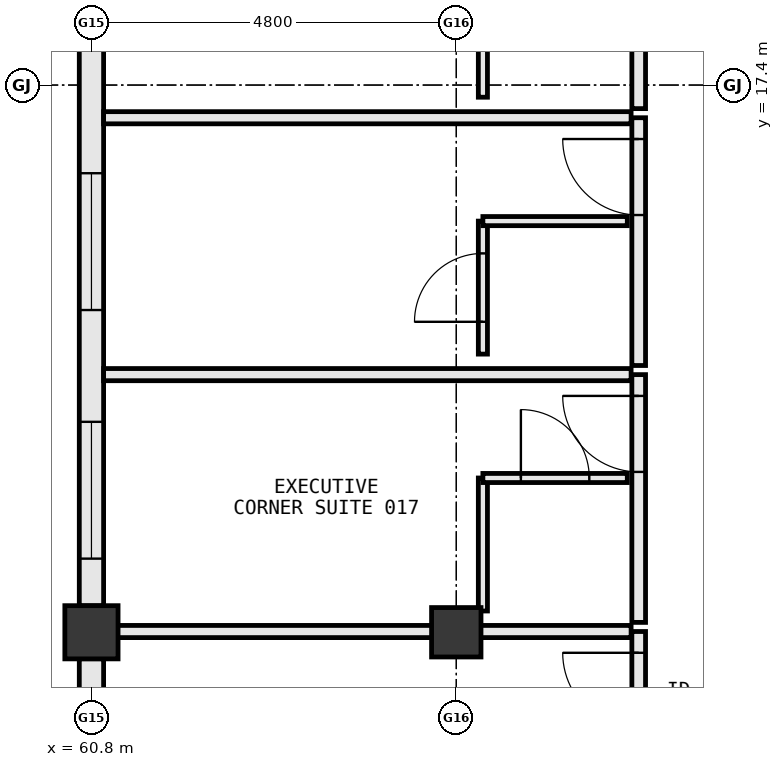
"""IFC4 building model, lengths in metres.
Left out: names, types, materials, properties, quantities, classifications, styles, units other than length and angle.
Written with IfcOpenShell. Run it as: python <this file> out.ifc"""

import sys

from ifc_helpers import new_model, si_unit, direction, frame, frame_2d, origin, origin_2d, place, context, subcontext, project, spatial, rectangle, extrude, element, fill, save


model = new_model("IFC4")
c1 = context("Model", 3, precision=1e-05, world=origin(), true_north=direction((0.0, 1.0)))
c2 = subcontext(c1, "Body", "Model", "MODEL_VIEW")
j1 = project(units=[si_unit("LENGTHUNIT", "METRE"), si_unit("PLANEANGLEUNIT", "RADIAN")], contexts=[c1])
p1 = place(None, origin())
s1 = spatial("IfcSite", under=j1, at=p1, CompositionType="ELEMENT")
p2 = place(p1, origin())
s2 = spatial("IfcBuilding", under=s1, at=p2, CompositionType="ELEMENT")
p3 = place(p2, frame((0.0, 0.0, 10.8)))
s3 = spatial("IfcBuildingStorey", under=s2, at=p3, CompositionType="ELEMENT", Elevation=10.8)
p4 = place(p3, frame((60.8, 10.2, 0.0), z_axis=(0.0, 0.0, 1.0), x_axis=(1.0, 0.0, 0.0)))
e1 = element("IfcColumn", 1, at=p4, inside=s3, PredefinedType="COLUMN", context=c2, shape_type="SweptSolid", body=[
    extrude(rectangle(XDim=0.7, YDim=0.7, at=origin_2d()), origin(), (0.0, 0.0, 1.0), 5.4),
])
p5 = place(p3, frame((65.6, 10.2, 0.0), z_axis=(0.0, 0.0, 1.0), x_axis=(1.0, 0.0, 0.0)))
e2 = element("IfcColumn", 2, at=p5, inside=s3, PredefinedType="COLUMN", context=c2, shape_type="SweptSolid", body=[
    extrude(rectangle(XDim=0.65, YDim=0.65, at=origin_2d()), origin(), (0.0, 0.0, 1.0), 5.4),
])
p6 = place(p3, frame((60.8, 18.252, 0.0), z_axis=(0.0, 0.0, 1.0), x_axis=(0.0, -1.0, 0.0)))
e3 = element("IfcWall", 3, at=p6, inside=s3, PredefinedType="STANDARD", context=c2, shape_type="SweptSolid", body=[
    extrude(rectangle(XDim=7.704, YDim=0.32, at=frame_2d((3.852, 0.0))), origin(), (0.0, 0.0, 1.0), 4.255),
])
p7 = place(p6, frame((5.283, 0.0, 0.85)))
e4 = element("IfcOpeningElement", 4, at=p7, cuts=e3, PredefinedType="OPENING", context=c2, shape_type="SweptSolid", body=[
    extrude(rectangle(XDim=1.8, YDim=1.85, at=frame_2d((0.9, 0.925))), frame((0.0, 0.172, 0.0), z_axis=(0.0, -1.0, 0.0), x_axis=(1.0, 0.0, 0.0)), (0.0, 0.0, 1.0), 0.344),
])
p8 = place(p6, frame((2.012, 0.0, 0.85)))
e5 = element("IfcOpeningElement", 5, at=p8, cuts=e3, PredefinedType="OPENING", context=c2, shape_type="SweptSolid", body=[
    extrude(rectangle(XDim=1.8, YDim=1.85, at=frame_2d((0.9, 0.925))), frame((0.0, 0.172, 0.0), z_axis=(0.0, -1.0, 0.0), x_axis=(1.0, 0.0, 0.0)), (0.0, 0.0, 1.0), 0.344),
])
p9 = place(p3, frame((60.8, 9.852, 0.0), z_axis=(0.0, 0.0, 1.0), x_axis=(0.0, -1.0, 0.0)))
e6 = element("IfcWall", 6, at=p9, inside=s3, PredefinedType="STANDARD", context=c2, shape_type="SweptSolid", body=[
    extrude(rectangle(XDim=8.904, YDim=0.32, at=frame_2d((4.452, 0.0))), origin(), (0.0, 0.0, 1.0), 4.155),
])
p10 = place(p9, frame((3.477, 0.0, 0.85)))
e7 = element("IfcOpeningElement", 7, at=p10, cuts=e6, PredefinedType="OPENING", context=c2, shape_type="SweptSolid", body=[
    extrude(rectangle(XDim=1.95, YDim=1.9, at=frame_2d((0.975, 0.95))), frame((0.0, 0.172, 0.0), z_axis=(0.0, -1.0, 0.0), x_axis=(1.0, 0.0, 0.0)), (0.0, 0.0, 1.0), 0.344),
])
p11 = place(p9, frame((6.753, 0.0, 0.85)))
e8 = element("IfcOpeningElement", 8, at=p11, cuts=e6, PredefinedType="OPENING", context=c2, shape_type="SweptSolid", body=[
    extrude(rectangle(XDim=1.8, YDim=1.85, at=frame_2d((0.9, 0.925))), frame((0.0, 0.172, 0.0), z_axis=(0.0, -1.0, 0.0), x_axis=(1.0, 0.0, 0.0)), (0.0, 0.0, 1.0), 0.344),
])
p12 = place(p9, frame((0.551, 0.0, 0.85)))
e9 = element("IfcOpeningElement", 9, at=p12, cuts=e6, PredefinedType="OPENING", context=c2, shape_type="SweptSolid", body=[
    extrude(rectangle(XDim=1.8, YDim=1.85, at=frame_2d((0.9, 0.925))), frame((0.0, 0.172, 0.0), z_axis=(0.0, -1.0, 0.0), x_axis=(1.0, 0.0, 0.0)), (0.0, 0.0, 1.0), 0.344),
])
p13 = place(p3, frame((68.0, 6.95, 0.0), z_axis=(0.0, 0.0, 1.0), x_axis=(0.0, 1.0, 0.0)))
e10 = element("IfcWall", 10, at=p13, inside=s3, PredefinedType="PARTITIONING", context=c2, shape_type="SweptSolid", body=[
    extrude(rectangle(XDim=3.26, YDim=0.18, at=frame_2d((1.63, 0.0))), origin(), (0.0, 0.0, 1.0), 4.8),
])
p14 = place(p13, frame((1.98, 0.0, 0.0)))
e11 = element("IfcOpeningElement", 11, at=p14, cuts=e10, PredefinedType="OPENING", context=c2, shape_type="SweptSolid", body=[
    extrude(rectangle(XDim=1.0, YDim=2.2, at=frame_2d((0.5, 1.1))), frame((0.0, 0.102, 0.0), z_axis=(0.0, -1.0, 0.0), x_axis=(1.0, 0.0, 0.0)), (0.0, 0.0, 1.0), 0.204),
])
p15 = place(p3, frame((60.96, 10.21, 0.0), z_axis=(0.0, 0.0, 1.0), x_axis=(1.0, 0.0, 0.0)))
e12 = element("IfcWall", 12, at=p15, inside=s3, PredefinedType="PARTITIONING", context=c2, shape_type="SweptSolid", body=[
    extrude(rectangle(XDim=6.94, YDim=0.16, at=frame_2d((3.47, 0.0))), origin(), (0.0, 0.0, 1.0), 4.175),
])
p16 = place(p3, frame((68.0, 10.33, 0.0), z_axis=(0.0, 0.0, 1.0), x_axis=(0.0, 1.0, 0.0)))
e13 = element("IfcWall", 13, at=p16, inside=s3, PredefinedType="PARTITIONING", context=c2, shape_type="SweptSolid", body=[
    extrude(rectangle(XDim=3.26, YDim=0.18, at=frame_2d((1.63, 0.0))), origin(), (0.0, 0.0, 1.0), 4.8),
])
p17 = place(p16, frame((1.98, 0.0, 0.0)))
e14 = element("IfcOpeningElement", 14, at=p17, cuts=e13, PredefinedType="OPENING", context=c2, shape_type="SweptSolid", body=[
    extrude(rectangle(XDim=1.0, YDim=2.2, at=frame_2d((0.5, 1.1))), frame((0.0, 0.102, 0.0), z_axis=(0.0, -1.0, 0.0), x_axis=(1.0, 0.0, 0.0)), (0.0, 0.0, 1.0), 0.204),
])
p18 = place(p3, frame((60.96, 13.59, 0.0), z_axis=(0.0, 0.0, 1.0), x_axis=(1.0, 0.0, 0.0)))
e15 = element("IfcWall", 15, at=p18, inside=s3, PredefinedType="PARTITIONING", context=c2, shape_type="SweptSolid", body=[
    extrude(rectangle(XDim=6.94, YDim=0.16, at=frame_2d((3.47, 0.0))), origin(), (0.0, 0.0, 1.0), 4.8),
])
p19 = place(p3, frame((65.95, 10.48, 0.0), z_axis=(0.0, 0.0, 1.0), x_axis=(0.0, 1.0, 0.0)))
e16 = element("IfcWall", 16, at=p19, inside=s3, PredefinedType="PARTITIONING", context=c2, shape_type="SweptSolid", body=[
    extrude(rectangle(XDim=1.75, YDim=0.12, at=frame_2d((0.875, 0.0))), origin(), (0.0, 0.0, 1.0), 4.255),
])
p20 = place(p3, frame((65.95, 12.23, 0.0), z_axis=(0.0, 0.0, 1.0), x_axis=(1.0, 0.0, 0.0)))
e17 = element("IfcWall", 17, at=p20, inside=s3, PredefinedType="PARTITIONING", context=c2, shape_type="SweptSolid", body=[
    extrude(rectangle(XDim=1.9, YDim=0.12, at=frame_2d((0.95, 0.0))), origin(), (0.0, 0.0, 1.0), 4.8),
])
p21 = place(p20, frame((0.5, 0.0, 0.0)))
e18 = element("IfcOpeningElement", 18, at=p21, cuts=e17, PredefinedType="OPENING", context=c2, shape_type="SweptSolid", body=[
    extrude(rectangle(XDim=0.9, YDim=2.15, at=frame_2d((0.45, 1.075))), frame((0.0, 0.072, 0.0), z_axis=(0.0, -1.0, 0.0), x_axis=(1.0, 0.0, 0.0)), (0.0, 0.0, 1.0), 0.144),
])
p22 = place(p3, frame((68.0, 13.71, 0.0), z_axis=(0.0, 0.0, 1.0), x_axis=(0.0, 1.0, 0.0)))
e19 = element("IfcWall", 19, at=p22, inside=s3, PredefinedType="PARTITIONING", context=c2, shape_type="SweptSolid", body=[
    extrude(rectangle(XDim=3.26, YDim=0.18, at=frame_2d((1.63, 0.0))), origin(), (0.0, 0.0, 1.0), 4.8),
])
p23 = place(p22, frame((1.98, 0.0, 0.0)))
e20 = element("IfcOpeningElement", 20, at=p23, cuts=e19, PredefinedType="OPENING", context=c2, shape_type="SweptSolid", body=[
    extrude(rectangle(XDim=1.0, YDim=2.2, at=frame_2d((0.5, 1.1))), frame((0.0, 0.102, 0.0), z_axis=(0.0, -1.0, 0.0), x_axis=(1.0, 0.0, 0.0)), (0.0, 0.0, 1.0), 0.204),
])
p24 = place(p3, frame((60.96, 16.97, 0.0), z_axis=(0.0, 0.0, 1.0), x_axis=(1.0, 0.0, 0.0)))
e21 = element("IfcWall", 21, at=p24, inside=s3, PredefinedType="PARTITIONING", context=c2, shape_type="SweptSolid", body=[
    extrude(rectangle(XDim=6.94, YDim=0.16, at=frame_2d((3.47, 0.0))), origin(), (0.0, 0.0, 1.0), 4.8),
])
p25 = place(p3, frame((65.95, 13.86, 0.0), z_axis=(0.0, 0.0, 1.0), x_axis=(0.0, 1.0, 0.0)))
e22 = element("IfcWall", 22, at=p25, inside=s3, PredefinedType="PARTITIONING", context=c2, shape_type="SweptSolid", body=[
    extrude(rectangle(XDim=1.75, YDim=0.12, at=frame_2d((0.875, 0.0))), origin(), (0.0, 0.0, 1.0), 4.255),
])
p26 = place(p25, frame((0.425, 0.0, 0.0)))
e23 = element("IfcOpeningElement", 23, at=p26, cuts=e22, PredefinedType="OPENING", context=c2, shape_type="SweptSolid", body=[
    extrude(rectangle(XDim=0.9, YDim=2.15, at=frame_2d((0.45, 1.075))), frame((0.0, 0.072, 0.0), z_axis=(0.0, -1.0, 0.0), x_axis=(1.0, 0.0, 0.0)), (0.0, 0.0, 1.0), 0.144),
])
p27 = place(p3, frame((65.95, 15.61, 0.0), z_axis=(0.0, 0.0, 1.0), x_axis=(1.0, 0.0, 0.0)))
e24 = element("IfcWall", 24, at=p27, inside=s3, PredefinedType="PARTITIONING", context=c2, shape_type="SweptSolid", body=[
    extrude(rectangle(XDim=1.9, YDim=0.12, at=frame_2d((0.95, 0.0))), origin(), (0.0, 0.0, 1.0), 4.8),
])
p28 = place(p3, frame((68.0, 17.09, 0.0), z_axis=(0.0, 0.0, 1.0), x_axis=(0.0, 1.0, 0.0)))
e25 = element("IfcWall", 25, at=p28, inside=s3, PredefinedType="PARTITIONING", context=c2, shape_type="SweptSolid", body=[
    extrude(rectangle(XDim=3.26, YDim=0.18, at=frame_2d((1.63, 0.0))), origin(), (0.0, 0.0, 1.0), 4.8),
])
p29 = place(p28, frame((1.98, 0.0, 0.0)))
e26 = element("IfcOpeningElement", 26, at=p29, cuts=e25, PredefinedType="OPENING", context=c2, shape_type="SweptSolid", body=[
    extrude(rectangle(XDim=1.0, YDim=2.2, at=frame_2d((0.5, 1.1))), frame((0.0, 0.102, 0.0), z_axis=(0.0, -1.0, 0.0), x_axis=(1.0, 0.0, 0.0)), (0.0, 0.0, 1.0), 0.204),
])
p30 = place(p3, frame((65.95, 17.24, 0.0), z_axis=(0.0, 0.0, 1.0), x_axis=(0.0, 1.0, 0.0)))
e27 = element("IfcWall", 27, at=p30, inside=s3, PredefinedType="PARTITIONING", context=c2, shape_type="SweptSolid", body=[
    extrude(rectangle(XDim=1.75, YDim=0.12, at=frame_2d((0.875, 0.0))), origin(), (0.0, 0.0, 1.0), 4.255),
])
p31 = place(p7, origin())
e28 = element("IfcWindow", 28, at=p31, inside=s3, PartitioningType="SINGLE_PANEL", PredefinedType="WINDOW", context=c2, shape_type="SweptSolid", body=[
    extrude(rectangle(XDim=1.8, YDim=1.85, at=frame_2d((0.9, 0.925))), frame((0.0, 0.03, 0.0), z_axis=(0.0, -1.0, 0.0), x_axis=(1.0, 0.0, 0.0)), (0.0, 0.0, 1.0), 0.06),
])
fill(e4, e28)
p32 = place(p8, origin())
e29 = element("IfcWindow", 29, at=p32, inside=s3, PartitioningType="SINGLE_PANEL", PredefinedType="WINDOW", context=c2, shape_type="SweptSolid", body=[
    extrude(rectangle(XDim=1.8, YDim=1.85, at=frame_2d((0.9, 0.925))), frame((0.0, 0.03, 0.0), z_axis=(0.0, -1.0, 0.0), x_axis=(1.0, 0.0, 0.0)), (0.0, 0.0, 1.0), 0.06),
])
fill(e5, e29)
p33 = place(p14, origin())
e30 = element("IfcDoor", 30, at=p33, inside=s3, OperationType="SINGLE_SWING_RIGHT", PredefinedType="DOOR", context=c2, shape_type="SweptSolid", body=[
    extrude(rectangle(XDim=1.0, YDim=2.2, at=frame_2d((0.5, 1.1))), frame((0.0, 0.025, 0.0), z_axis=(0.0, -1.0, 0.0), x_axis=(1.0, 0.0, 0.0)), (0.0, 0.0, 1.0), 0.05),
])
fill(e11, e30)
p34 = place(p17, origin())
e31 = element("IfcDoor", 31, at=p34, inside=s3, OperationType="SINGLE_SWING_RIGHT", PredefinedType="DOOR", context=c2, shape_type="SweptSolid", body=[
    extrude(rectangle(XDim=1.0, YDim=2.2, at=frame_2d((0.5, 1.1))), frame((0.0, 0.025, 0.0), z_axis=(0.0, -1.0, 0.0), x_axis=(1.0, 0.0, 0.0)), (0.0, 0.0, 1.0), 0.05),
])
fill(e14, e31)
p35 = place(p21, origin())
e32 = element("IfcDoor", 32, at=p35, inside=s3, OperationType="SINGLE_SWING_LEFT", PredefinedType="DOOR", context=c2, shape_type="SweptSolid", body=[
    extrude(rectangle(XDim=0.9, YDim=2.15, at=frame_2d((0.45, 1.075))), frame((0.0, 0.025, 0.0), z_axis=(0.0, -1.0, 0.0), x_axis=(1.0, 0.0, 0.0)), (0.0, 0.0, 1.0), 0.05),
])
fill(e18, e32)
p36 = place(p23, origin())
e33 = element("IfcDoor", 33, at=p36, inside=s3, OperationType="SINGLE_SWING_RIGHT", PredefinedType="DOOR", context=c2, shape_type="SweptSolid", body=[
    extrude(rectangle(XDim=1.0, YDim=2.2, at=frame_2d((0.5, 1.1))), frame((0.0, 0.025, 0.0), z_axis=(0.0, -1.0, 0.0), x_axis=(1.0, 0.0, 0.0)), (0.0, 0.0, 1.0), 0.05),
])
fill(e20, e33)
p37 = place(p26, origin())
e34 = element("IfcDoor", 34, at=p37, inside=s3, OperationType="SINGLE_SWING_LEFT", PredefinedType="DOOR", context=c2, shape_type="SweptSolid", body=[
    extrude(rectangle(XDim=0.9, YDim=2.15, at=frame_2d((0.45, 1.075))), frame((0.0, 0.025, 0.0), z_axis=(0.0, -1.0, 0.0), x_axis=(1.0, 0.0, 0.0)), (0.0, 0.0, 1.0), 0.05),
])
fill(e23, e34)
save(model, sys.argv[1])
